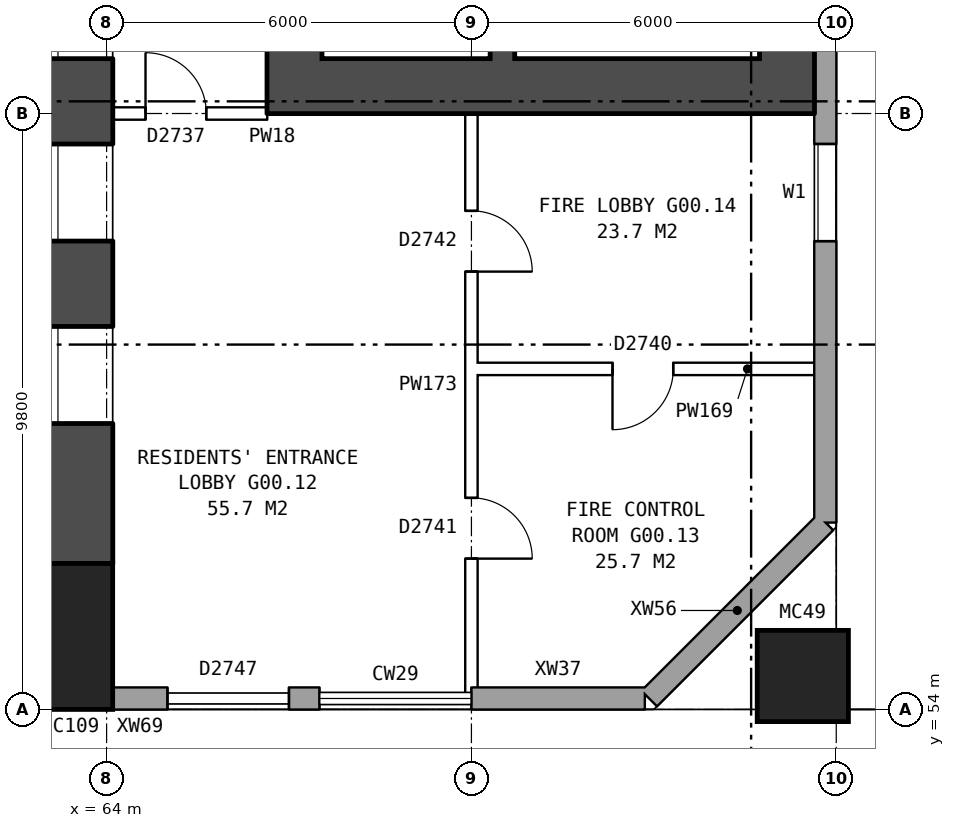
"""IFC4 building model, lengths in metres.
Left out: names, types, materials, properties, quantities, classifications, styles, units other than length and angle.
Written with IfcOpenShell. Run it as: python <this file> out.ifc"""

import sys

from ifc_helpers import new_model, si_unit, direction, frame, frame_2d, origin, origin_2d, place, context, subcontext, project, spatial, rectangle, hollow_rectangle, extrude, element, fill, save


model = new_model("IFC4")
c1 = context("Model", 3, precision=1e-05, world=origin(), true_north=direction((0.0, 1.0)))
c2 = subcontext(c1, "Body", "Model", "MODEL_VIEW")
j1 = project(units=[si_unit("LENGTHUNIT", "METRE"), si_unit("PLANEANGLEUNIT", "RADIAN")], contexts=[c1])
p1 = place(None, origin())
s1 = spatial("IfcSite", under=j1, at=p1, CompositionType="ELEMENT")
p2 = place(p1, origin())
s2 = spatial("IfcBuilding", under=s1, at=p2, CompositionType="ELEMENT")
p3 = place(p2, origin())
s3 = spatial("IfcBuildingStorey", under=s2, at=p3, CompositionType="ELEMENT", Elevation=0.0)
p4 = place(p3, frame((63.5, 55.2, -0.35), z_axis=(0.0, 0.0, 1.0), x_axis=(1.0, 0.0, 0.0)))
e1 = element("IfcColumn", 1, at=p4, inside=s3, PredefinedType="COLUMN", context=c2, shape_type="SweptSolid", body=[
    extrude(rectangle(XDim=1.2, YDim=2.4, at=origin_2d()), origin(), (0.0, 0.0, 1.0), 5.55),
])
p5 = place(p3, frame((63.5, 56.4, -0.35), z_axis=(0.0, 0.0, 1.0), x_axis=(0.0, 1.0, 0.0)))
e2 = element("IfcWall", 2, at=p5, inside=s3, PredefinedType="SHEAR", context=c2, shape_type="SweptSolid", body=[
    extrude(rectangle(XDim=27.2, YDim=1.2, at=frame_2d((13.6, 0.0))), origin(), (0.0, 0.0, 1.0), 5.55),
])
p6 = place(p5, frame((2.3, 0.0, 0.8)))
e3 = element("IfcOpeningElement", 3, at=p6, cuts=e2, PredefinedType="OPENING", context=c2, shape_type="SweptSolid", body=[
    extrude(rectangle(XDim=1.6, YDim=1.8, at=frame_2d((0.8, 0.9))), frame((0.0, 0.61, 0.0), z_axis=(0.0, -1.0, 0.0), x_axis=(1.0, 0.0, 0.0)), (0.0, 0.0, 1.0), 1.22),
])
p7 = place(p5, frame((5.3, 0.0, 0.8)))
e4 = element("IfcOpeningElement", 4, at=p7, cuts=e2, PredefinedType="OPENING", context=c2, shape_type="SweptSolid", body=[
    extrude(rectangle(XDim=1.6, YDim=1.8, at=frame_2d((0.8, 0.9))), frame((0.0, 0.61, 0.0), z_axis=(0.0, -1.0, 0.0), x_axis=(1.0, 0.0, 0.0)), (0.0, 0.0, 1.0), 1.22),
])
p8 = place(p5, frame((8.3, 0.0, 0.8)))
e5 = element("IfcOpeningElement", 5, at=p8, cuts=e2, PredefinedType="OPENING", context=c2, shape_type="SweptSolid", body=[
    extrude(rectangle(XDim=1.6, YDim=1.8, at=frame_2d((0.8, 0.9))), frame((0.0, 0.61, 0.0), z_axis=(0.0, -1.0, 0.0), x_axis=(1.0, 0.0, 0.0)), (0.0, 0.0, 1.0), 1.22),
])
p9 = place(p5, frame((11.3, 0.0, 0.8)))
e6 = element("IfcOpeningElement", 6, at=p9, cuts=e2, PredefinedType="OPENING", context=c2, shape_type="SweptSolid", body=[
    extrude(rectangle(XDim=1.6, YDim=1.8, at=frame_2d((0.8, 0.9))), frame((0.0, 0.61, 0.0), z_axis=(0.0, -1.0, 0.0), x_axis=(1.0, 0.0, 0.0)), (0.0, 0.0, 1.0), 1.22),
])
p10 = place(p5, frame((14.3, 0.0, 0.8)))
e7 = element("IfcOpeningElement", 7, at=p10, cuts=e2, PredefinedType="OPENING", context=c2, shape_type="SweptSolid", body=[
    extrude(rectangle(XDim=1.6, YDim=1.8, at=frame_2d((0.8, 0.9))), frame((0.0, 0.61, 0.0), z_axis=(0.0, -1.0, 0.0), x_axis=(1.0, 0.0, 0.0)), (0.0, 0.0, 1.0), 1.22),
])
p11 = place(p5, frame((17.3, 0.0, 0.8)))
e8 = element("IfcOpeningElement", 8, at=p11, cuts=e2, PredefinedType="OPENING", context=c2, shape_type="SweptSolid", body=[
    extrude(rectangle(XDim=1.6, YDim=1.8, at=frame_2d((0.8, 0.9))), frame((0.0, 0.61, 0.0), z_axis=(0.0, -1.0, 0.0), x_axis=(1.0, 0.0, 0.0)), (0.0, 0.0, 1.0), 1.22),
])
p12 = place(p5, frame((20.3, 0.0, 0.8)))
e9 = element("IfcOpeningElement", 9, at=p12, cuts=e2, PredefinedType="OPENING", context=c2, shape_type="SweptSolid", body=[
    extrude(rectangle(XDim=1.6, YDim=1.8, at=frame_2d((0.8, 0.9))), frame((0.0, 0.61, 0.0), z_axis=(0.0, -1.0, 0.0), x_axis=(1.0, 0.0, 0.0)), (0.0, 0.0, 1.0), 1.22),
])
p13 = place(p5, frame((23.3, 0.0, 0.8)))
e10 = element("IfcOpeningElement", 10, at=p13, cuts=e2, PredefinedType="OPENING", context=c2, shape_type="SweptSolid", body=[
    extrude(rectangle(XDim=1.6, YDim=1.8, at=frame_2d((0.8, 0.9))), frame((0.0, 0.61, 0.0), z_axis=(0.0, -1.0, 0.0), x_axis=(1.0, 0.0, 0.0)), (0.0, 0.0, 1.0), 1.22),
])
p14 = place(p3, frame((75.45, 54.55, -0.35), z_axis=(0.0, 0.0, 1.0), x_axis=(1.0, 0.0, 0.0)))
e11 = element("IfcColumn", 11, at=p14, inside=s3, PredefinedType="COLUMN", context=c2, shape_type="SweptSolid", body=[
    extrude(hollow_rectangle(XDim=1.5, YDim=1.5, WallThickness=0.08, at=origin_2d()), origin(), (0.0, 0.0, 1.0), 5.85),
])
p15 = place(p3, frame((70.0, 54.18, 0.0), z_axis=(0.0, 0.0, 1.0), x_axis=(1.0, 0.0, 0.0)))
e12 = element("IfcWall", 12, at=p15, inside=s3, PredefinedType="STANDARD", context=c2, shape_type="SweptSolid", body=[
    extrude(rectangle(XDim=2.85, YDim=0.36, at=frame_2d((1.425, 0.0))), origin(), (0.0, 0.0, 1.0), 5.2),
])
p16 = place(p3, frame((64.1, 54.18, 0.0), z_axis=(0.0, 0.0, 1.0), x_axis=(1.0, 0.0, 0.0)))
e13 = element("IfcWall", 13, at=p16, inside=s3, PredefinedType="STANDARD", context=c2, shape_type="SweptSolid", body=[
    extrude(rectangle(XDim=3.4, YDim=0.36, at=frame_2d((1.7, 0.0))), origin(), (0.0, 0.0, 1.0), 5.2),
])
p17 = place(p16, frame((0.9, 0.0, 0.0)))
e14 = element("IfcOpeningElement", 14, at=p17, cuts=e13, PredefinedType="OPENING", context=c2, shape_type="SweptSolid", body=[
    extrude(rectangle(XDim=2.0, YDim=2.4, at=frame_2d((1.0, 1.2))), frame((0.0, 0.19, 0.0), z_axis=(0.0, -1.0, 0.0), x_axis=(1.0, 0.0, 0.0)), (0.0, 0.0, 1.0), 0.38),
])
p18 = place(p3, frame((72.925, 54.18, 0.0), z_axis=(0.0, 0.0, 1.0), x_axis=(0.707106781187, 0.707106781187, 0.0)))
e15 = element("IfcWall", 15, at=p18, inside=s3, PredefinedType="STANDARD", context=c2, shape_type="SweptSolid", body=[
    extrude(rectangle(XDim=4.094, YDim=0.36, at=frame_2d((2.047, 0.0))), origin(), (0.0, 0.0, 1.0), 5.2),
])
p19 = place(p3, frame((75.82, 57.075, 0.0), z_axis=(0.0, 0.0, 1.0), x_axis=(0.0, 1.0, 0.0)))
e16 = element("IfcWall", 16, at=p19, inside=s3, PredefinedType="STANDARD", context=c2, shape_type="SweptSolid", body=[
    extrude(rectangle(XDim=25.851, YDim=0.36, at=frame_2d((12.925, 0.0))), origin(), (0.0, 0.0, 1.0), 5.2),
])
p20 = place(p19, frame((4.625, 0.0, 0.8)))
e17 = element("IfcOpeningElement", 17, at=p20, cuts=e16, PredefinedType="OPENING", context=c2, shape_type="SweptSolid", body=[
    extrude(rectangle(XDim=1.6, YDim=1.8, at=frame_2d((0.8, 0.9))), frame((0.0, 0.19, 0.0), z_axis=(0.0, -1.0, 0.0), x_axis=(1.0, 0.0, 0.0)), (0.0, 0.0, 1.0), 0.38),
])
p21 = place(p19, frame((16.625, 0.0, 0.0)))
e18 = element("IfcOpeningElement", 18, at=p21, cuts=e16, PredefinedType="OPENING", context=c2, shape_type="SweptSolid", body=[
    extrude(rectangle(XDim=1.1, YDim=2.1, at=frame_2d((0.55, 1.05))), frame((0.0, 0.19, 0.0), z_axis=(0.0, -1.0, 0.0), x_axis=(1.0, 0.0, 0.0)), (0.0, 0.0, 1.0), 0.38),
])
p22 = place(p3, frame((67.09, 64.7, 0.0), z_axis=(0.0, 0.0, 1.0), x_axis=(0.0, 1.0, 0.0)))
e19 = element("IfcWall", 19, at=p22, inside=s3, PredefinedType="SHEAR", context=c2, shape_type="SweptSolid", body=[
    extrude(rectangle(XDim=10.6, YDim=0.9, at=frame_2d((5.3, 0.0))), origin(), (0.0, 0.0, 1.0), 5.2),
])
p23 = place(p22, frame((0.425, 0.0, 0.0)))
e20 = element("IfcOpeningElement", 20, at=p23, cuts=e19, PredefinedType="OPENING", context=c2, shape_type="SweptSolid", body=[
    extrude(rectangle(XDim=1.1, YDim=2.1, at=frame_2d((0.55, 1.05))), frame((0.0, 0.46, 0.0), z_axis=(0.0, -1.0, 0.0), x_axis=(1.0, 0.0, 0.0)), (0.0, 0.0, 1.0), 0.92),
])
p24 = place(p22, frame((2.7, 0.0, 0.0)))
e21 = element("IfcOpeningElement", 21, at=p24, cuts=e19, PredefinedType="OPENING", context=c2, shape_type="SweptSolid", body=[
    extrude(rectangle(XDim=1.1, YDim=2.1, at=frame_2d((0.55, 1.05))), frame((0.0, 0.46, 0.0), z_axis=(0.0, -1.0, 0.0), x_axis=(1.0, 0.0, 0.0)), (0.0, 0.0, 1.0), 0.92),
])
p25 = place(p22, frame((4.9, 0.0, 0.0)))
e22 = element("IfcOpeningElement", 22, at=p25, cuts=e19, PredefinedType="OPENING", context=c2, shape_type="SweptSolid", body=[
    extrude(rectangle(XDim=1.1, YDim=2.1, at=frame_2d((0.55, 1.05))), frame((0.0, 0.46, 0.0), z_axis=(0.0, -1.0, 0.0), x_axis=(1.0, 0.0, 0.0)), (0.0, 0.0, 1.0), 0.92),
])
p26 = place(p22, frame((7.1, 0.0, 0.0)))
e23 = element("IfcOpeningElement", 23, at=p26, cuts=e19, PredefinedType="OPENING", context=c2, shape_type="SweptSolid", body=[
    extrude(rectangle(XDim=1.1, YDim=2.1, at=frame_2d((0.55, 1.05))), frame((0.0, 0.46, 0.0), z_axis=(0.0, -1.0, 0.0), x_axis=(1.0, 0.0, 0.0)), (0.0, 0.0, 1.0), 0.92),
])
p27 = place(p22, frame((9.0, 0.0, 0.0)))
e24 = element("IfcOpeningElement", 24, at=p27, cuts=e19, PredefinedType="OPENING", context=c2, shape_type="SweptSolid", body=[
    extrude(rectangle(XDim=1.1, YDim=2.1, at=frame_2d((0.55, 1.05))), frame((0.0, 0.46, 0.0), z_axis=(0.0, -1.0, 0.0), x_axis=(1.0, 0.0, 0.0)), (0.0, 0.0, 1.0), 0.92),
])
p28 = place(p3, frame((75.19, 64.7, 0.0), z_axis=(0.0, 0.0, 1.0), x_axis=(0.0, 1.0, 0.0)))
e25 = element("IfcWall", 25, at=p28, inside=s3, PredefinedType="SHEAR", context=c2, shape_type="SweptSolid", body=[
    extrude(rectangle(XDim=10.6, YDim=0.9, at=frame_2d((5.3, 0.0))), origin(), (0.0, 0.0, 1.0), 5.2),
])
p29 = place(p28, frame((9.0, 0.0, 0.0)))
e26 = element("IfcOpeningElement", 26, at=p29, cuts=e25, PredefinedType="OPENING", context=c2, shape_type="SweptSolid", body=[
    extrude(rectangle(XDim=1.1, YDim=2.1, at=frame_2d((0.55, 1.05))), frame((0.0, 0.46, 0.0), z_axis=(0.0, -1.0, 0.0), x_axis=(1.0, 0.0, 0.0)), (0.0, 0.0, 1.0), 0.92),
])
p30 = place(p3, frame((66.64, 64.25, 0.0), z_axis=(0.0, 0.0, 1.0), x_axis=(1.0, 0.0, 0.0)))
e27 = element("IfcWall", 27, at=p30, inside=s3, PredefinedType="SHEAR", context=c2, shape_type="SweptSolid", body=[
    extrude(rectangle(XDim=9.0, YDim=0.9, at=frame_2d((4.5, 0.0))), origin(), (0.0, 0.0, 1.0), 5.2),
])
p31 = place(p3, frame((70.51, 64.7, 0.0), z_axis=(0.0, 0.0, 1.0), x_axis=(0.0, 1.0, 0.0)))
e28 = element("IfcWall", 28, at=p31, inside=s3, PredefinedType="SHEAR", context=c2, shape_type="SweptSolid", body=[
    extrude(rectangle(XDim=1.95, YDim=0.4, at=frame_2d((0.975, 0.0))), origin(), (0.0, 0.0, 1.0), 5.2),
])
p32 = place(p3, frame((69.9, 59.6, 0.0), z_axis=(0.0, 0.0, 1.0), x_axis=(1.0, 0.0, 0.0)))
e29 = element("IfcWall", 29, at=p32, inside=s3, PredefinedType="PARTITIONING", context=c2, shape_type="SweptSolid", body=[
    extrude(rectangle(XDim=5.86, YDim=0.2, at=frame_2d((2.93, 0.0))), origin(), (0.0, 0.0, 1.0), 5.2),
])
p33 = place(p32, frame((2.42, 0.0, 0.0)))
e30 = element("IfcOpeningElement", 30, at=p33, cuts=e29, PredefinedType="OPENING", context=c2, shape_type="SweptSolid", body=[
    extrude(rectangle(XDim=1.0, YDim=2.1, at=frame_2d((0.5, 1.05))), frame((0.0, 0.11, 0.0), z_axis=(0.0, -1.0, 0.0), x_axis=(1.0, 0.0, 0.0)), (0.0, 0.0, 1.0), 0.22),
])
p34 = place(p3, frame((64.1, 63.8, 0.0), z_axis=(0.0, 0.0, 1.0), x_axis=(1.0, 0.0, 0.0)))
e31 = element("IfcWall", 31, at=p34, inside=s3, PredefinedType="PARTITIONING", context=c2, shape_type="SweptSolid", body=[
    extrude(rectangle(XDim=2.54, YDim=0.2, at=frame_2d((1.27, 0.0))), origin(), (0.0, 0.0, 1.0), 5.2),
])
p35 = place(p34, frame((0.54, 0.0, 0.0)))
e32 = element("IfcOpeningElement", 32, at=p35, cuts=e31, PredefinedType="OPENING", context=c2, shape_type="SweptSolid", body=[
    extrude(rectangle(XDim=1.0, YDim=2.1, at=frame_2d((0.5, 1.05))), frame((0.0, 0.11, 0.0), z_axis=(0.0, -1.0, 0.0), x_axis=(1.0, 0.0, 0.0)), (0.0, 0.0, 1.0), 0.22),
])
p36 = place(p3, frame((70.0, 54.24, 0.0), z_axis=(0.0, 0.0, 1.0), x_axis=(0.0, 1.0, 0.0)))
e33 = element("IfcWall", 33, at=p36, inside=s3, PredefinedType="PARTITIONING", context=c2, shape_type="SweptSolid", body=[
    extrude(rectangle(XDim=9.56, YDim=0.2, at=frame_2d((4.78, 0.0))), origin(), (0.0, 0.0, 1.0), 5.2),
])
p37 = place(p36, frame((2.24, 0.0, 0.0)))
e34 = element("IfcOpeningElement", 34, at=p37, cuts=e33, PredefinedType="OPENING", context=c2, shape_type="SweptSolid", body=[
    extrude(rectangle(XDim=1.0, YDim=2.1, at=frame_2d((0.5, 1.05))), frame((0.0, 0.11, 0.0), z_axis=(0.0, -1.0, 0.0), x_axis=(1.0, 0.0, 0.0)), (0.0, 0.0, 1.0), 0.22),
])
p38 = place(p36, frame((6.96, 0.0, 0.0)))
e35 = element("IfcOpeningElement", 35, at=p38, cuts=e33, PredefinedType="OPENING", context=c2, shape_type="SweptSolid", body=[
    extrude(rectangle(XDim=1.0, YDim=2.1, at=frame_2d((0.5, 1.05))), frame((0.0, 0.11, 0.0), z_axis=(0.0, -1.0, 0.0), x_axis=(1.0, 0.0, 0.0)), (0.0, 0.0, 1.0), 0.22),
])
p39 = place(p17, frame((2.0, 0.0, 0.0), z_axis=(0.0, 0.0, 1.0), x_axis=(-1.0, 0.0, 0.0)))
e36 = element("IfcDoor", 36, at=p39, inside=s3, OperationType="DOUBLE_DOOR_SLIDING", PredefinedType="DOOR", context=c2, shape_type="SweptSolid", body=[
    extrude(rectangle(XDim=2.0, YDim=2.4, at=frame_2d((1.0, 1.2))), frame((0.0, 0.025, 0.0), z_axis=(0.0, -1.0, 0.0), x_axis=(1.0, 0.0, 0.0)), (0.0, 0.0, 1.0), 0.05),
])
fill(e14, e36)
p40 = place(p20, origin())
e37 = element("IfcWindow", 37, at=p40, inside=s3, PartitioningType="SINGLE_PANEL", PredefinedType="WINDOW", context=c2, shape_type="SweptSolid", body=[
    extrude(rectangle(XDim=1.6, YDim=1.8, at=frame_2d((0.8, 0.9))), frame((0.0, 0.15, 0.0), z_axis=(0.0, -1.0, 0.0), x_axis=(1.0, 0.0, 0.0)), (0.0, 0.0, 1.0), 0.06),
])
fill(e17, e37)
p41 = place(p6, origin())
e38 = element("IfcWindow", 38, at=p41, inside=s3, PartitioningType="SINGLE_PANEL", PredefinedType="WINDOW", context=c2, shape_type="SweptSolid", body=[
    extrude(rectangle(XDim=1.6, YDim=1.8, at=frame_2d((0.8, 0.9))), frame((0.0, 0.33, 0.0), z_axis=(0.0, -1.0, 0.0), x_axis=(1.0, 0.0, 0.0)), (0.0, 0.0, 1.0), 0.06),
])
fill(e3, e38)
p42 = place(p7, origin())
e39 = element("IfcWindow", 39, at=p42, inside=s3, PartitioningType="SINGLE_PANEL", PredefinedType="WINDOW", context=c2, shape_type="SweptSolid", body=[
    extrude(rectangle(XDim=1.6, YDim=1.8, at=frame_2d((0.8, 0.9))), frame((0.0, 0.33, 0.0), z_axis=(0.0, -1.0, 0.0), x_axis=(1.0, 0.0, 0.0)), (0.0, 0.0, 1.0), 0.06),
])
fill(e4, e39)
p43 = place(p8, origin())
e40 = element("IfcWindow", 40, at=p43, inside=s3, PartitioningType="SINGLE_PANEL", PredefinedType="WINDOW", context=c2, shape_type="SweptSolid", body=[
    extrude(rectangle(XDim=1.6, YDim=1.8, at=frame_2d((0.8, 0.9))), frame((0.0, 0.33, 0.0), z_axis=(0.0, -1.0, 0.0), x_axis=(1.0, 0.0, 0.0)), (0.0, 0.0, 1.0), 0.06),
])
fill(e5, e40)
p44 = place(p33, frame((1.0, 0.0, 0.0), z_axis=(0.0, 0.0, 1.0), x_axis=(-1.0, 0.0, 0.0)))
e41 = element("IfcDoor", 41, at=p44, inside=s3, OperationType="SINGLE_SWING_RIGHT", PredefinedType="DOOR", context=c2, shape_type="SweptSolid", body=[
    extrude(rectangle(XDim=1.0, YDim=2.1, at=frame_2d((0.5, 1.05))), frame((0.0, 0.025, 0.0), z_axis=(0.0, -1.0, 0.0), x_axis=(1.0, 0.0, 0.0)), (0.0, 0.0, 1.0), 0.05),
])
fill(e30, e41)
p45 = place(p35, origin())
e42 = element("IfcDoor", 42, at=p45, inside=s3, OperationType="SINGLE_SWING_LEFT", PredefinedType="DOOR", context=c2, shape_type="SweptSolid", body=[
    extrude(rectangle(XDim=1.0, YDim=2.1, at=frame_2d((0.5, 1.05))), frame((0.0, 0.025, 0.0), z_axis=(0.0, -1.0, 0.0), x_axis=(1.0, 0.0, 0.0)), (0.0, 0.0, 1.0), 0.05),
])
fill(e32, e42)
p46 = place(p37, frame((1.0, 0.0, 0.0), z_axis=(0.0, 0.0, 1.0), x_axis=(-1.0, 0.0, 0.0)))
e43 = element("IfcDoor", 43, at=p46, inside=s3, OperationType="SINGLE_SWING_RIGHT", PredefinedType="DOOR", context=c2, shape_type="SweptSolid", body=[
    extrude(rectangle(XDim=1.0, YDim=2.1, at=frame_2d((0.5, 1.05))), frame((0.0, 0.025, 0.0), z_axis=(0.0, -1.0, 0.0), x_axis=(1.0, 0.0, 0.0)), (0.0, 0.0, 1.0), 0.05),
])
fill(e34, e43)
p47 = place(p38, frame((1.0, 0.0, 0.0), z_axis=(0.0, 0.0, 1.0), x_axis=(-1.0, 0.0, 0.0)))
e44 = element("IfcDoor", 44, at=p47, inside=s3, OperationType="SINGLE_SWING_RIGHT", PredefinedType="DOOR", context=c2, shape_type="SweptSolid", body=[
    extrude(rectangle(XDim=1.0, YDim=2.1, at=frame_2d((0.5, 1.05))), frame((0.0, 0.025, 0.0), z_axis=(0.0, -1.0, 0.0), x_axis=(1.0, 0.0, 0.0)), (0.0, 0.0, 1.0), 0.05),
])
fill(e35, e44)
save(model, sys.argv[1])
